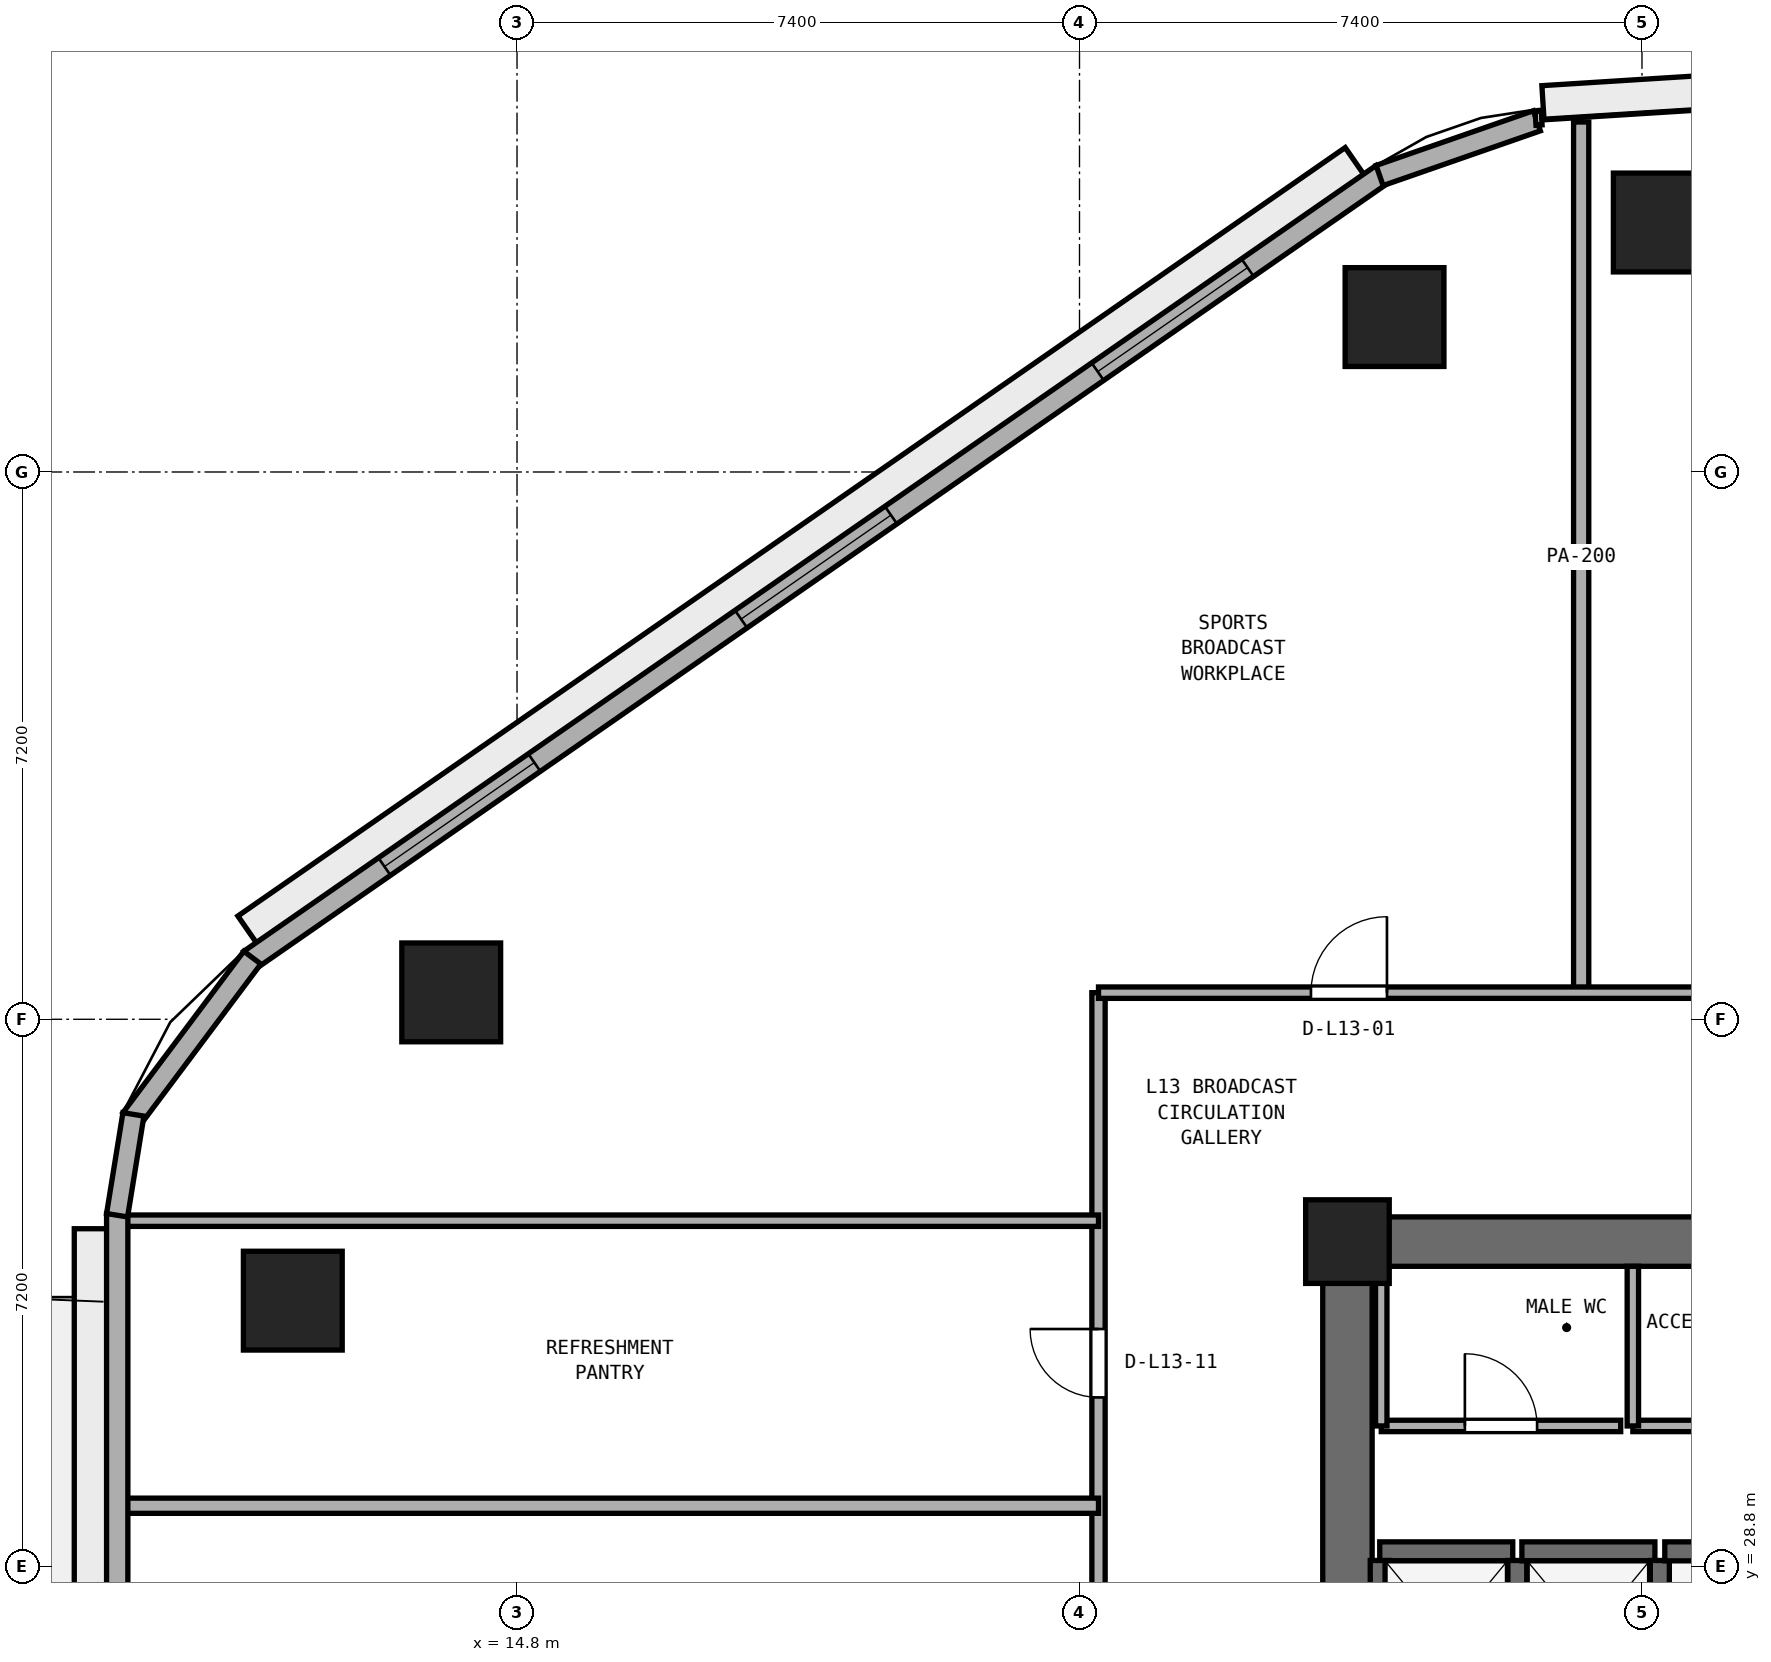
"""IFC4 building model, lengths in metres.
Left out: names, types, materials, properties, quantities, classifications, styles, units other than length and angle.
Written with IfcOpenShell. Run it as: python <this file> out.ifc"""

import sys

from ifc_helpers import new_model, si_unit, direction, frame, frame_2d, origin, origin_2d, place, context, subcontext, project, spatial, rectangle, extrude, element, fill, save


model = new_model("IFC4")
c1 = context("Model", 3, precision=1e-05, world=origin(), true_north=direction((0.0, 1.0)))
c2 = subcontext(c1, "Body", "Model", "MODEL_VIEW")
j1 = project(units=[si_unit("LENGTHUNIT", "METRE"), si_unit("PLANEANGLEUNIT", "RADIAN")], contexts=[c1])
p1 = place(None, origin())
s1 = spatial("IfcSite", under=j1, at=p1, CompositionType="ELEMENT")
p2 = place(p1, origin())
s2 = spatial("IfcBuilding", under=s1, at=p2, CompositionType="ELEMENT")
p3 = place(p2, frame((0.0, 0.0, 55.4)))
s3 = spatial("IfcBuildingStorey", under=s2, at=p3, CompositionType="ELEMENT", Elevation=55.4)
p4 = place(p3, frame((25.4, 33.075, 0.0), z_axis=(0.0, 0.0, 1.0), x_axis=(1.0, 0.0, 0.0)))
e1 = element("IfcWall", 1, at=p4, inside=s3, PredefinedType="SHEAR", context=c2, shape_type="SweptSolid", body=[
    extrude(rectangle(XDim=23.2, YDim=0.65, at=frame_2d((11.6, 0.0))), origin(), (0.0, 0.0, 1.0), 3.525),
])
p5 = place(p3, frame((25.725, 17.65, 0.0), z_axis=(0.0, 0.0, 1.0), x_axis=(0.0, 1.0, 0.0)))
e2 = element("IfcWall", 2, at=p5, inside=s3, PredefinedType="SHEAR", context=c2, shape_type="SweptSolid", body=[
    extrude(rectangle(XDim=15.1, YDim=0.65, at=frame_2d((7.55, 0.0))), origin(), (0.0, 0.0, 1.0), 3.525),
])
p6 = place(p5, frame((6.8, 0.0, 0.0)))
e3 = element("IfcOpeningElement", 3, at=p6, cuts=e2, PredefinedType="OPENING", context=c2, shape_type="SweptSolid", body=[
    extrude(rectangle(XDim=1.5, YDim=2.15, at=frame_2d((0.75, 1.075))), frame((0.0, 0.335, 0.0), z_axis=(0.0, -1.0, 0.0), x_axis=(1.0, 0.0, 0.0)), (0.0, 0.0, 1.0), 0.67),
])
p7 = place(p3, frame((25.725, 33.075, 0.0), z_axis=(0.0, 0.0, 1.0), x_axis=(1.0, 0.0, 0.0)))
e4 = element("IfcColumn", 4, at=p7, inside=s3, PredefinedType="PILASTER", context=c2, shape_type="SweptSolid", body=[
    extrude(rectangle(XDim=1.1, YDim=1.1, at=origin_2d()), origin(), (0.0, 0.0, 1.0), 3.8),
])
for number, where, z_axis, x_axis in (
    (5, (29.874, 46.482, 0.0), (0.0, 0.0, 1.0), (1.0, 0.0, 0.0)),
    (6, (26.344, 45.238, 0.0), (0.0, 0.0, 1.0), (1.0, 0.0, 0.0)),
    (7, (13.934, 36.354, 0.0), (0.0, 0.0, 1.0), (1.0, 0.0, 0.0)),
    (8, (11.85, 32.298, 0.0), (0.0, 0.0, 1.0), (1.0, 0.0, 0.0)),
):
    element("IfcColumn", number, at=place(p3, frame(where, z_axis=z_axis, x_axis=x_axis)), inside=s3, PredefinedType="COLUMN", context=c2, shape_type="SweptSolid", body=[
        extrude(rectangle(XDim=1.3, YDim=1.3, at=origin_2d()), origin(), (0.0, 0.0, 1.0), 3.8),
    ])
p8 = place(p3, frame((26.15, 29.0, 0.0), z_axis=(0.0, 0.0, 1.0), x_axis=(1.0, 0.0, 0.0)))
e9 = element("IfcWall", 9, at=p8, inside=s3, PredefinedType="SHEAR", context=c2, shape_type="SweptSolid", body=[
    extrude(rectangle(XDim=1.75, YDim=0.25, at=frame_2d((0.875, 0.0))), origin(), (0.0, 0.0, 1.0), 3.525),
])
for number, where, z_axis, x_axis in (
    (10, (26.15, 26.92, 0.0), (0.0, 0.0, 1.0), (0.0, 1.0, 0.0)),
    (11, (27.96, 26.92, 0.0), (0.0, 0.0, 1.0), (0.0, 1.0, 0.0)),
):
    element("IfcWall", number, at=place(p3, frame(where, z_axis=z_axis, x_axis=x_axis)), inside=s3, PredefinedType="SHEAR", context=c2, shape_type="SweptSolid", body=[
        extrude(rectangle(XDim=1.96, YDim=0.25, at=frame_2d((0.98, 0.0))), origin(), (0.0, 0.0, 1.0), 3.525),
    ])
p9 = place(p3, frame((28.02, 29.0, 0.0), z_axis=(0.0, 0.0, 1.0), x_axis=(1.0, 0.0, 0.0)))
e12 = element("IfcWall", 12, at=p9, inside=s3, PredefinedType="SHEAR", context=c2, shape_type="SweptSolid", body=[
    extrude(rectangle(XDim=1.75, YDim=0.25, at=frame_2d((0.875, 0.0))), origin(), (0.0, 0.0, 1.0), 3.525),
])
p10 = place(p3, frame((29.835, 26.92, 0.0), z_axis=(0.0, 0.0, 1.0), x_axis=(0.0, 1.0, 0.0)))
e13 = element("IfcWall", 13, at=p10, inside=s3, PredefinedType="SHEAR", context=c2, shape_type="SweptSolid", body=[
    extrude(rectangle(XDim=1.96, YDim=0.25, at=frame_2d((0.98, 0.0))), origin(), (0.0, 0.0, 1.0), 3.525),
])
p11 = place(p3, frame((29.9, 29.0, 0.0), z_axis=(0.0, 0.0, 1.0), x_axis=(1.0, 0.0, 0.0)))
e14 = element("IfcWall", 14, at=p11, inside=s3, PredefinedType="SHEAR", context=c2, shape_type="SweptSolid", body=[
    extrude(rectangle(XDim=1.72, YDim=0.25, at=frame_2d((0.86, 0.0))), origin(), (0.0, 0.0, 1.0), 3.525),
])
p12 = place(p3, frame((26.17, 30.65, 0.0), z_axis=(0.0, 0.0, 1.0), x_axis=(1.0, 0.0, 0.0)))
e15 = element("IfcWall", 15, at=p12, inside=s3, PredefinedType="PARTITIONING", context=c2, shape_type="SweptSolid", body=[
    extrude(rectangle(XDim=3.15, YDim=0.15, at=frame_2d((1.575, 0.0))), origin(), (0.0, 0.0, 1.0), 3.525),
])
p13 = place(p12, frame((1.1, 0.0, 0.0)))
e16 = element("IfcOpeningElement", 16, at=p13, cuts=e15, PredefinedType="OPENING", context=c2, shape_type="SweptSolid", body=[
    extrude(rectangle(XDim=0.95, YDim=2.1, at=frame_2d((0.475, 1.05))), frame((0.0, 0.085, 0.0), z_axis=(0.0, -1.0, 0.0), x_axis=(1.0, 0.0, 0.0)), (0.0, 0.0, 1.0), 0.17),
])
p14 = place(p3, frame((26.17, 30.65, 0.0), z_axis=(0.0, 0.0, 1.0), x_axis=(0.0, 1.0, 0.0)))
e17 = element("IfcWall", 17, at=p14, inside=s3, PredefinedType="PARTITIONING", context=c2, shape_type="SweptSolid", body=[
    extrude(rectangle(XDim=2.1, YDim=0.15, at=frame_2d((1.05, 0.0))), origin(), (0.0, 0.0, 1.0), 3.525),
])
p15 = place(p3, frame((29.48, 30.65, 0.0), z_axis=(0.0, 0.0, 1.0), x_axis=(1.0, 0.0, 0.0)))
e18 = element("IfcWall", 18, at=p15, inside=s3, PredefinedType="PARTITIONING", context=c2, shape_type="SweptSolid", body=[
    extrude(rectangle(XDim=3.19, YDim=0.15, at=frame_2d((1.595, 0.0))), origin(), (0.0, 0.0, 1.0), 3.525),
])
p16 = place(p15, frame((1.12, 0.0, 0.0)))
e19 = element("IfcOpeningElement", 19, at=p16, cuts=e18, PredefinedType="OPENING", context=c2, shape_type="SweptSolid", body=[
    extrude(rectangle(XDim=0.95, YDim=2.1, at=frame_2d((0.475, 1.05))), frame((0.0, 0.085, 0.0), z_axis=(0.0, -1.0, 0.0), x_axis=(1.0, 0.0, 0.0)), (0.0, 0.0, 1.0), 0.17),
])
p17 = place(p3, frame((29.48, 30.65, 0.0), z_axis=(0.0, 0.0, 1.0), x_axis=(0.0, 1.0, 0.0)))
e20 = element("IfcWall", 20, at=p17, inside=s3, PredefinedType="PARTITIONING", context=c2, shape_type="SweptSolid", body=[
    extrude(rectangle(XDim=2.1, YDim=0.15, at=frame_2d((1.05, 0.0))), origin(), (0.0, 0.0, 1.0), 3.525),
])
p18 = place(p3, frame((28.8, 36.35, 0.0), z_axis=(0.0, 0.0, 1.0), x_axis=(0.0, 1.0, 0.0)))
e21 = element("IfcWall", 21, at=p18, inside=s3, PredefinedType="PARTITIONING", context=c2, shape_type="SweptSolid", body=[
    extrude(rectangle(XDim=11.454, YDim=0.2, at=frame_2d((5.727, 0.0))), origin(), (0.0, 0.0, 1.0), 3.525),
])
p19 = place(p3, frame((22.45, 14.05, 0.0), z_axis=(0.0, 0.0, 1.0), x_axis=(0.0, 1.0, 0.0)))
e22 = element("IfcWall", 22, at=p19, inside=s3, PredefinedType="PARTITIONING", context=c2, shape_type="SweptSolid", body=[
    extrude(rectangle(XDim=22.3, YDim=0.175, at=frame_2d((11.15, 0.0))), origin(), (0.0, 0.0, 1.0), 3.525),
])
p20 = place(p19, frame((5.075, 0.0, 0.0)))
e23 = element("IfcOpeningElement", 23, at=p20, cuts=e22, PredefinedType="OPENING", context=c2, shape_type="SweptSolid", body=[
    extrude(rectangle(XDim=0.9, YDim=2.1, at=frame_2d((0.45, 1.05))), frame((0.0, 0.097, 0.0), z_axis=(0.0, -1.0, 0.0), x_axis=(1.0, 0.0, 0.0)), (0.0, 0.0, 1.0), 0.195),
])
p21 = place(p19, frame((11.35, 0.0, 0.0)))
e24 = element("IfcOpeningElement", 24, at=p21, cuts=e22, PredefinedType="OPENING", context=c2, shape_type="SweptSolid", body=[
    extrude(rectangle(XDim=0.9, YDim=2.1, at=frame_2d((0.45, 1.05))), frame((0.0, 0.097, 0.0), z_axis=(0.0, -1.0, 0.0), x_axis=(1.0, 0.0, 0.0)), (0.0, 0.0, 1.0), 0.195),
])
p22 = place(p19, frame((16.975, 0.0, 0.0)))
e25 = element("IfcOpeningElement", 25, at=p22, cuts=e22, PredefinedType="OPENING", context=c2, shape_type="SweptSolid", body=[
    extrude(rectangle(XDim=0.9, YDim=2.1, at=frame_2d((0.45, 1.05))), frame((0.0, 0.097, 0.0), z_axis=(0.0, -1.0, 0.0), x_axis=(1.0, 0.0, 0.0)), (0.0, 0.0, 1.0), 0.195),
])
p23 = place(p3, frame((9.605, 29.6, 0.0), z_axis=(0.0, 0.0, 1.0), x_axis=(1.0, 0.0, 0.0)))
e26 = element("IfcWall", 26, at=p23, inside=s3, PredefinedType="PARTITIONING", context=c2, shape_type="SweptSolid", body=[
    extrude(rectangle(XDim=12.845, YDim=0.2, at=frame_2d((6.422, 0.0))), origin(), (0.0, 0.0, 1.0), 3.525),
])
p24 = place(p3, frame((9.605, 33.35, 0.0), z_axis=(0.0, 0.0, 1.0), x_axis=(1.0, 0.0, 0.0)))
e27 = element("IfcWall", 27, at=p24, inside=s3, PredefinedType="PARTITIONING", context=c2, shape_type="SweptSolid", body=[
    extrude(rectangle(XDim=12.845, YDim=0.15, at=frame_2d((6.422, 0.0))), origin(), (0.0, 0.0, 1.0), 3.525),
])
p25 = place(p3, frame((22.45, 36.35, 0.0), z_axis=(0.0, 0.0, 1.0), x_axis=(1.0, 0.0, 0.0)))
e28 = element("IfcWall", 28, at=p25, inside=s3, PredefinedType="PARTITIONING", context=c2, shape_type="SweptSolid", body=[
    extrude(rectangle(XDim=29.1, YDim=0.15, at=frame_2d((14.55, 0.0))), origin(), (0.0, 0.0, 1.0), 3.525),
])
p26 = place(p25, frame((2.795, 0.0, 0.0)))
e29 = element("IfcOpeningElement", 29, at=p26, cuts=e28, PredefinedType="OPENING", context=c2, shape_type="SweptSolid", body=[
    extrude(rectangle(XDim=1.0, YDim=2.12, at=frame_2d((0.5, 1.06))), frame((0.0, 0.085, 0.0), z_axis=(0.0, -1.0, 0.0), x_axis=(1.0, 0.0, 0.0)), (0.0, 0.0, 1.0), 0.17),
])
p27 = place(p25, frame((10.15, 0.0, 0.0)))
e30 = element("IfcOpeningElement", 30, at=p27, cuts=e28, PredefinedType="OPENING", context=c2, shape_type="SweptSolid", body=[
    extrude(rectangle(XDim=1.0, YDim=2.12, at=frame_2d((0.5, 1.06))), frame((0.0, 0.085, 0.0), z_axis=(0.0, -1.0, 0.0), x_axis=(1.0, 0.0, 0.0)), (0.0, 0.0, 1.0), 0.17),
])
p28 = place(p25, frame((18.65, 0.0, 0.0)))
e31 = element("IfcOpeningElement", 31, at=p28, cuts=e28, PredefinedType="OPENING", context=c2, shape_type="SweptSolid", body=[
    extrude(rectangle(XDim=1.0, YDim=2.12, at=frame_2d((0.5, 1.06))), frame((0.0, 0.085, 0.0), z_axis=(0.0, -1.0, 0.0), x_axis=(1.0, 0.0, 0.0)), (0.0, 0.0, 1.0), 0.17),
])
p29 = place(p25, frame((25.605, 0.0, 0.0)))
e32 = element("IfcOpeningElement", 32, at=p29, cuts=e28, PredefinedType="OPENING", context=c2, shape_type="SweptSolid", body=[
    extrude(rectangle(XDim=1.0, YDim=2.12, at=frame_2d((0.5, 1.06))), frame((0.0, 0.085, 0.0), z_axis=(0.0, -1.0, 0.0), x_axis=(1.0, 0.0, 0.0)), (0.0, 0.0, 1.0), 0.17),
])
p30 = place(p3, frame((26.182, 47.118, 0.0), z_axis=(0.0, 0.0, 1.0), x_axis=(-0.821547956627, -0.570139417127, 0.0)))
e33 = element("IfcWall", 33, at=p30, inside=s3, PredefinedType="STANDARD", context=c2, shape_type="SweptSolid", body=[
    extrude(rectangle(XDim=18.132, YDim=0.28, at=frame_2d((9.066, 0.0))), origin(), (0.0, 0.0, 1.0), 3.525),
])
p31 = place(p30, frame((2.156, 0.0, 0.9)))
e34 = element("IfcOpeningElement", 34, at=p31, cuts=e33, PredefinedType="OPENING", context=c2, shape_type="SweptSolid", body=[
    extrude(rectangle(XDim=2.4, YDim=1.75, at=frame_2d((1.2, 0.875))), frame((0.0, 0.15, 0.0), z_axis=(0.0, -1.0, 0.0), x_axis=(1.0, 0.0, 0.0)), (0.0, 0.0, 1.0), 0.3),
])
p32 = place(p30, frame((7.866, 0.0, 0.9)))
e35 = element("IfcOpeningElement", 35, at=p32, cuts=e33, PredefinedType="OPENING", context=c2, shape_type="SweptSolid", body=[
    extrude(rectangle(XDim=2.4, YDim=1.75, at=frame_2d((1.2, 0.875))), frame((0.0, 0.15, 0.0), z_axis=(0.0, -1.0, 0.0), x_axis=(1.0, 0.0, 0.0)), (0.0, 0.0, 1.0), 0.3),
])
p33 = place(p30, frame((13.577, 0.0, 0.9)))
e36 = element("IfcOpeningElement", 36, at=p33, cuts=e33, PredefinedType="OPENING", context=c2, shape_type="SweptSolid", body=[
    extrude(rectangle(XDim=2.4, YDim=1.75, at=frame_2d((1.2, 0.875))), frame((0.0, 0.15, 0.0), z_axis=(0.0, -1.0, 0.0), x_axis=(1.0, 0.0, 0.0)), (0.0, 0.0, 1.0), 0.3),
])
p34 = place(p3, frame((9.54, 33.444, 0.0), z_axis=(0.0, 0.0, 1.0), x_axis=(0.0, -1.0, 0.0)))
e37 = element("IfcWall", 37, at=p34, inside=s3, PredefinedType="STANDARD", context=c2, shape_type="SweptSolid", body=[
    extrude(rectangle(XDim=17.301, YDim=0.28, at=frame_2d((8.65, 0.0))), origin(), (0.0, 0.0, 1.0), 3.525),
])
p35 = place(p34, frame((8.1, 0.0, 0.0)))
e38 = element("IfcOpeningElement", 38, at=p35, cuts=e37, PredefinedType="OPENING", context=c2, shape_type="SweptSolid", body=[
    extrude(rectangle(XDim=1.1, YDim=2.2, at=frame_2d((0.55, 1.1))), frame((0.0, 0.15, 0.0), z_axis=(0.0, -1.0, 0.0), x_axis=(1.0, 0.0, 0.0)), (0.0, 0.0, 1.0), 0.3),
])
p36 = place(p34, frame((12.884, 0.0, 0.9)))
e39 = element("IfcOpeningElement", 39, at=p36, cuts=e37, PredefinedType="OPENING", context=c2, shape_type="SweptSolid", body=[
    extrude(rectangle(XDim=2.4, YDim=1.75, at=frame_2d((1.2, 0.875))), frame((0.0, 0.15, 0.0), z_axis=(0.0, -1.0, 0.0), x_axis=(1.0, 0.0, 0.0)), (0.0, 0.0, 1.0), 0.3),
])
p37 = place(p3, frame((28.217, 47.82, 0.0), z_axis=(0.0, 0.0, 1.0), x_axis=(-0.944478751803, -0.328572499447, 0.0)))
e40 = element("IfcWall", 40, at=p37, inside=s3, PredefinedType="STANDARD", context=c2, shape_type="SweptSolid", body=[
    extrude(rectangle(XDim=2.19, YDim=0.28, at=frame_2d((1.095, 0.0))), origin(), (0.0, 0.0, 1.0), 3.525),
])
p38 = place(p3, frame((11.318, 36.811, 0.0), z_axis=(0.0, 0.0, 1.0), x_axis=(-0.599455152629, -0.800408345775, 0.0)))
e41 = element("IfcWall", 41, at=p38, inside=s3, PredefinedType="STANDARD", context=c2, shape_type="SweptSolid", body=[
    extrude(rectangle(XDim=2.653, YDim=0.28, at=frame_2d((1.327, 0.0))), origin(), (0.0, 0.0, 1.0), 3.525),
])
p39 = place(p3, frame((9.753, 34.749, 0.0), z_axis=(0.0, 0.0, 1.0), x_axis=(-0.160037671962, -0.987110907423, 0.0)))
e42 = element("IfcWall", 42, at=p39, inside=s3, PredefinedType="STANDARD", context=c2, shape_type="SweptSolid", body=[
    extrude(rectangle(XDim=1.344, YDim=0.28, at=frame_2d((0.672, 0.0))), origin(), (0.0, 0.0, 1.0), 3.525),
])
p40 = place(p13, origin())
e43 = element("IfcDoor", 43, at=p40, inside=s3, OperationType="SINGLE_SWING_LEFT", PredefinedType="DOOR", context=c2, shape_type="SweptSolid", body=[
    extrude(rectangle(XDim=0.95, YDim=2.1, at=frame_2d((0.475, 1.05))), frame((0.0, 0.025, 0.0), z_axis=(0.0, -1.0, 0.0), x_axis=(1.0, 0.0, 0.0)), (0.0, 0.0, 1.0), 0.05),
])
fill(e16, e43)
p41 = place(p26, origin())
e44 = element("IfcDoor", 44, at=p41, inside=s3, OperationType="SINGLE_SWING_RIGHT", PredefinedType="DOOR", context=c2, shape_type="SweptSolid", body=[
    extrude(rectangle(XDim=1.0, YDim=2.12, at=frame_2d((0.5, 1.06))), frame((0.0, 0.025, 0.0), z_axis=(0.0, -1.0, 0.0), x_axis=(1.0, 0.0, 0.0)), (0.0, 0.0, 1.0), 0.05),
])
fill(e29, e44)
p42 = place(p22, origin())
e45 = element("IfcDoor", 45, at=p42, inside=s3, OperationType="SINGLE_SWING_RIGHT", PredefinedType="DOOR", context=c2, shape_type="SweptSolid", body=[
    extrude(rectangle(XDim=0.9, YDim=2.1, at=frame_2d((0.45, 1.05))), frame((0.0, 0.025, 0.0), z_axis=(0.0, -1.0, 0.0), x_axis=(1.0, 0.0, 0.0)), (0.0, 0.0, 1.0), 0.05),
])
fill(e25, e45)
p43 = place(p31, origin())
e46 = element("IfcWindow", 46, at=p43, inside=s3, PartitioningType="SINGLE_PANEL", PredefinedType="WINDOW", context=c2, shape_type="SweptSolid", body=[
    extrude(rectangle(XDim=2.4, YDim=1.75, at=frame_2d((1.2, 0.875))), frame((0.0, 0.03, 0.0), z_axis=(0.0, -1.0, 0.0), x_axis=(1.0, 0.0, 0.0)), (0.0, 0.0, 1.0), 0.06),
])
fill(e34, e46)
p44 = place(p32, origin())
e47 = element("IfcWindow", 47, at=p44, inside=s3, PartitioningType="SINGLE_PANEL", PredefinedType="WINDOW", context=c2, shape_type="SweptSolid", body=[
    extrude(rectangle(XDim=2.4, YDim=1.75, at=frame_2d((1.2, 0.875))), frame((0.0, 0.03, 0.0), z_axis=(0.0, -1.0, 0.0), x_axis=(1.0, 0.0, 0.0)), (0.0, 0.0, 1.0), 0.06),
])
fill(e35, e47)
p45 = place(p33, origin())
e48 = element("IfcWindow", 48, at=p45, inside=s3, PartitioningType="SINGLE_PANEL", PredefinedType="WINDOW", context=c2, shape_type="SweptSolid", body=[
    extrude(rectangle(XDim=2.4, YDim=1.75, at=frame_2d((1.2, 0.875))), frame((0.0, 0.03, 0.0), z_axis=(0.0, -1.0, 0.0), x_axis=(1.0, 0.0, 0.0)), (0.0, 0.0, 1.0), 0.06),
])
fill(e36, e48)
save(model, sys.argv[1])
